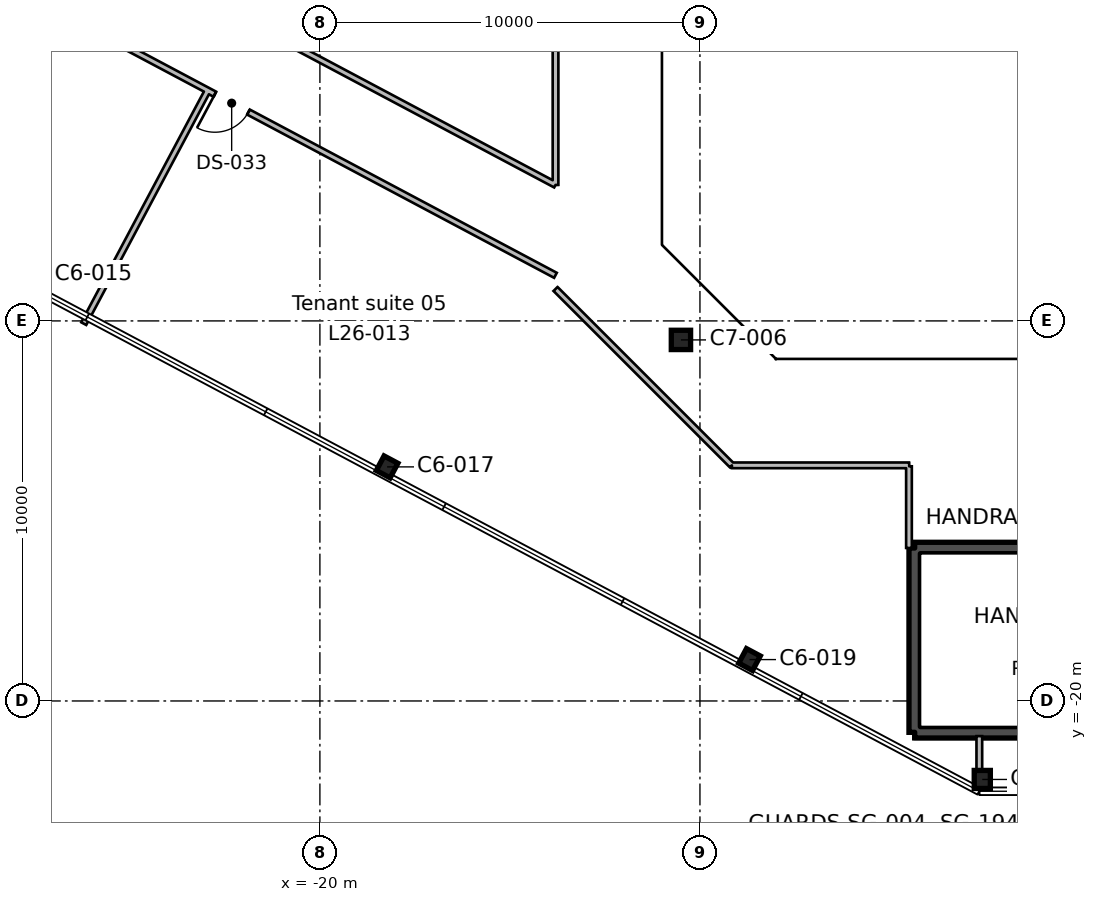
"""IFC4 building model, lengths in metres.
Left out: names, types, materials, properties, quantities, classifications, styles, units other than length and angle.
Written with IfcOpenShell. Run it as: python <this file> out.ifc"""

import sys

from ifc_helpers import new_model, si_unit, direction, frame, frame_2d, origin, origin_2d, place, context, subcontext, project, spatial, rectangle, hollow_rectangle, i_section, extrude, element, fill, save


model = new_model("IFC4")
c1 = context("Model", 3, precision=1e-05, world=origin(), true_north=direction((0.0, 1.0)))
c2 = subcontext(c1, "Body", "Model", "MODEL_VIEW")
j1 = project(units=[si_unit("LENGTHUNIT", "METRE"), si_unit("PLANEANGLEUNIT", "RADIAN")], contexts=[c1])
p1 = place(None, origin())
s1 = spatial("IfcSite", under=j1, at=p1, CompositionType="ELEMENT")
p2 = place(p1, origin())
s2 = spatial("IfcBuilding", under=s1, at=p2, CompositionType="ELEMENT")
p3 = place(p2, frame((0.0, 0.0, 130.2)))
s3 = spatial("IfcBuildingStorey", under=s2, at=p3, CompositionType="ELEMENT", Elevation=130.2)
p4 = place(p3, frame((-2.571, -22.065, 0.0), z_axis=(0.0, 0.0, 1.0), x_axis=(1.0, 0.0, 0.0)))
e1 = element("IfcColumn", 1, at=p4, inside=s3, PredefinedType="COLUMN", context=c2, shape_type="SweptSolid", body=[
    extrude(i_section(OverallWidth=0.424, OverallDepth=0.475, WebThickness=0.048, FlangeThickness=0.077, FilletRadius=0.015, at=origin_2d()), origin(), (0.0, 0.0, 1.0), 4.0),
])
for number, where, z_axis, x_axis in (
    (2, (-8.696, -18.911, 0.0), (0.0, 0.0, 1.0), (0.883, -0.469, 0.0)),
    (3, (-18.232, -13.841, 0.0), (0.0, 0.0, 1.0), (0.883, -0.469, 0.0)),
):
    element("IfcColumn", number, at=place(p3, frame(where, z_axis=z_axis, x_axis=x_axis)), inside=s3, PredefinedType="COLUMN", context=c2, shape_type="SweptSolid", body=[
        extrude(i_section(OverallWidth=0.412, OverallDepth=0.434, WebThickness=0.036, FlangeThickness=0.057, FilletRadius=0.015, at=origin_2d()), origin(), (0.0, 0.0, 1.0), 4.0),
    ])
p5 = place(p3, frame((-10.5, -10.5, 0.0), z_axis=(0.0, 0.0, 1.0), x_axis=(1.0, 0.0, 0.0)))
e4 = element("IfcColumn", 4, at=p5, inside=s3, PredefinedType="COLUMN", context=c2, shape_type="SweptSolid", body=[
    extrude(hollow_rectangle(XDim=0.508, YDim=0.508, WallThickness=0.012, InnerFilletRadius=0.006, OuterFilletRadius=0.018, at=origin_2d()), origin(), (0.0, 0.0, 1.0), 4.0),
])
p6 = place(p3, frame((3.95, -20.825, 0.0), z_axis=(0.0, 0.0, 1.0), x_axis=(-1.0, 0.0, 0.0)))
e5 = element("IfcWall", 5, at=p6, inside=s3, PredefinedType="SHEAR", context=c2, shape_type="SweptSolid", body=[
    extrude(rectangle(XDim=8.3, YDim=0.3, at=frame_2d((4.15, 0.0))), origin(), (0.0, 0.0, 1.0), 4.0),
])
p7 = place(p3, frame((-4.35, -20.825, 0.0), z_axis=(0.0, 0.0, 1.0), x_axis=(0.0, 1.0, 0.0)))
e6 = element("IfcWall", 6, at=p7, inside=s3, PredefinedType="SHEAR", context=c2, shape_type="SweptSolid", body=[
    extrude(rectangle(XDim=4.85, YDim=0.3, at=frame_2d((2.425, 0.0))), origin(), (0.0, 0.0, 1.0), 4.0),
])
p8 = place(p3, frame((-4.35, -15.975, 0.0), z_axis=(0.0, 0.0, 1.0), x_axis=(1.0, 0.0, 0.0)))
e7 = element("IfcWall", 7, at=p8, inside=s3, PredefinedType="SHEAR", context=c2, shape_type="SweptSolid", body=[
    extrude(rectangle(XDim=8.3, YDim=0.3, at=frame_2d((4.15, 0.0))), origin(), (0.0, 0.0, 1.0), 4.0),
])
p9 = place(p8, frame((6.05, 0.0, 0.0)))
e8 = element("IfcOpeningElement", 8, at=p9, cuts=e7, PredefinedType="OPENING", context=c2, shape_type="SweptSolid", body=[
    extrude(rectangle(XDim=1.9, YDim=2.1, at=frame_2d((0.95, 1.05))), frame((0.0, 0.16, 0.0), z_axis=(0.0, -1.0, 0.0), x_axis=(1.0, 0.0, 0.0)), (0.0, 0.0, 1.0), 0.32),
])
p10 = place(p3, frame((-13.802, -8.8, 0.0), z_axis=(0.0, 0.0, 1.0), x_axis=(-0.882950330338, 0.4694664143, 0.0)))
e9 = element("IfcWall", 9, at=p10, inside=s3, PredefinedType="PARTITIONING", context=c2, shape_type="SweptSolid", body=[
    extrude(rectangle(XDim=35.198, YDim=0.15, at=frame_2d((17.599, 0.0))), origin(), (0.0, 0.0, 1.0), 3.64),
])
p11 = place(p10, frame((26.55, 0.0, 0.0)))
e10 = element("IfcOpeningElement", 10, at=p11, cuts=e9, PredefinedType="OPENING", context=c2, shape_type="SweptSolid", body=[
    extrude(rectangle(XDim=1.0, YDim=2.1, at=frame_2d((0.5, 1.05))), frame((0.0, 0.085, 0.0), z_axis=(0.0, -1.0, 0.0), x_axis=(1.0, 0.0, 0.0)), (0.0, 0.0, 1.0), 0.17),
])
p12 = place(p10, frame((17.05, 0.0, 0.0)))
e11 = element("IfcOpeningElement", 11, at=p12, cuts=e9, PredefinedType="OPENING", context=c2, shape_type="SweptSolid", body=[
    extrude(rectangle(XDim=1.0, YDim=2.1, at=frame_2d((0.5, 1.05))), frame((0.0, 0.085, 0.0), z_axis=(0.0, -1.0, 0.0), x_axis=(1.0, 0.0, 0.0)), (0.0, 0.0, 1.0), 0.17),
])
p13 = place(p10, frame((9.149, 0.0, 0.0)))
e12 = element("IfcOpeningElement", 12, at=p13, cuts=e9, PredefinedType="OPENING", context=c2, shape_type="SweptSolid", body=[
    extrude(rectangle(XDim=1.0, YDim=2.1, at=frame_2d((0.5, 1.05))), frame((0.0, 0.085, 0.0), z_axis=(0.0, -1.0, 0.0), x_axis=(1.0, 0.0, 0.0)), (0.0, 0.0, 1.0), 0.17),
])
p14 = place(p3, frame((-22.951, -3.936, 0.0), z_axis=(0.0, 0.0, 1.0), x_axis=(-0.469541311651, -0.882910503196, 0.0)))
e13 = element("IfcWall", 13, at=p14, inside=s3, PredefinedType="PARTITIONING", context=c2, shape_type="SweptSolid", body=[
    extrude(rectangle(XDim=6.95, YDim=0.15, at=frame_2d((3.475, 0.0))), origin(), (0.0, 0.0, 1.0), 3.64),
])
p15 = place(p3, frame((-13.8, -6.423, 0.0), z_axis=(0.0, 0.0, 1.0), x_axis=(-0.882948498314, 0.469469859869, 0.0)))
e14 = element("IfcWall", 14, at=p15, inside=s3, PredefinedType="PARTITIONING", context=c2, shape_type="SweptSolid", body=[
    extrude(rectangle(XDim=22.521, YDim=0.15, at=frame_2d((11.261, 0.0))), origin(), (0.0, 0.0, 1.0), 3.64),
])
p16 = place(p15, frame((10.35, 0.0, 0.0)))
e15 = element("IfcOpeningElement", 15, at=p16, cuts=e14, PredefinedType="OPENING", context=c2, shape_type="SweptSolid", body=[
    extrude(rectangle(XDim=1.8, YDim=2.1, at=frame_2d((0.9, 1.05))), frame((0.0, 0.085, 0.0), z_axis=(0.0, -1.0, 0.0), x_axis=(1.0, 0.0, 0.0)), (0.0, 0.0, 1.0), 0.17),
])
p17 = place(p3, frame((-13.8, 9.16, 0.0), z_axis=(0.0, 0.0, 1.0), x_axis=(0.0, -1.0, 0.0)))
e16 = element("IfcWall", 16, at=p17, inside=s3, PredefinedType="PARTITIONING", context=c2, shape_type="SweptSolid", body=[
    extrude(rectangle(XDim=15.583, YDim=0.15, at=frame_2d((7.792, 0.0))), origin(), (0.0, 0.0, 1.0), 3.64),
])
p18 = place(p3, frame((-4.494, -13.8, 0.0), z_axis=(0.0, 0.0, 1.0), x_axis=(-1.0, 0.0, 0.0)))
e17 = element("IfcWall", 17, at=p18, inside=s3, PredefinedType="PARTITIONING", context=c2, shape_type="SweptSolid", body=[
    extrude(rectangle(XDim=4.666, YDim=0.15, at=frame_2d((2.333, 0.0))), origin(), (0.0, 0.0, 1.0), 3.64),
])
p19 = place(p3, frame((-9.16, -13.8, 0.0), z_axis=(0.0, 0.0, 1.0), x_axis=(-0.707106781187, 0.707106781187, 0.0)))
e18 = element("IfcWall", 18, at=p19, inside=s3, PredefinedType="PARTITIONING", context=c2, shape_type="SweptSolid", body=[
    extrude(rectangle(XDim=6.562, YDim=0.15, at=frame_2d((3.281, 0.0))), origin(), (0.0, 0.0, 1.0), 3.64),
])
p20 = place(p3, frame((-4.5, -15.975, 0.0), z_axis=(0.0, 0.0, 1.0), x_axis=(0.0, 1.0, 0.0)))
e19 = element("IfcWall", 19, at=p20, inside=s3, PredefinedType="PARTITIONING", context=c2, shape_type="SweptSolid", body=[
    extrude(rectangle(XDim=2.15, YDim=0.15, at=frame_2d((1.075, 0.0))), origin(), (0.0, 0.0, 1.0), 3.64),
])
p21 = place(p3, frame((-2.649, -20.925, 0.0), z_axis=(0.0, 0.0, 1.0), x_axis=(0.0, -1.0, 0.0)))
e20 = element("IfcWall", 20, at=p21, inside=s3, PredefinedType="PARTITIONING", context=c2, shape_type="SweptSolid", body=[
    extrude(rectangle(XDim=0.903, YDim=0.15, at=frame_2d((0.451, 0.0))), origin(), (0.0, 0.0, 1.0), 3.64),
])
p22 = place(p13, origin())
e21 = element("IfcDoor", 21, at=p22, inside=s3, OperationType="SINGLE_SWING_RIGHT", PredefinedType="DOOR", context=c2, shape_type="SweptSolid", body=[
    extrude(rectangle(XDim=1.0, YDim=2.1, at=frame_2d((0.5, 1.05))), frame((0.0, 0.025, 0.0), z_axis=(0.0, -1.0, 0.0), x_axis=(1.0, 0.0, 0.0)), (0.0, 0.0, 1.0), 0.05),
])
fill(e12, e21)
save(model, sys.argv[1])
